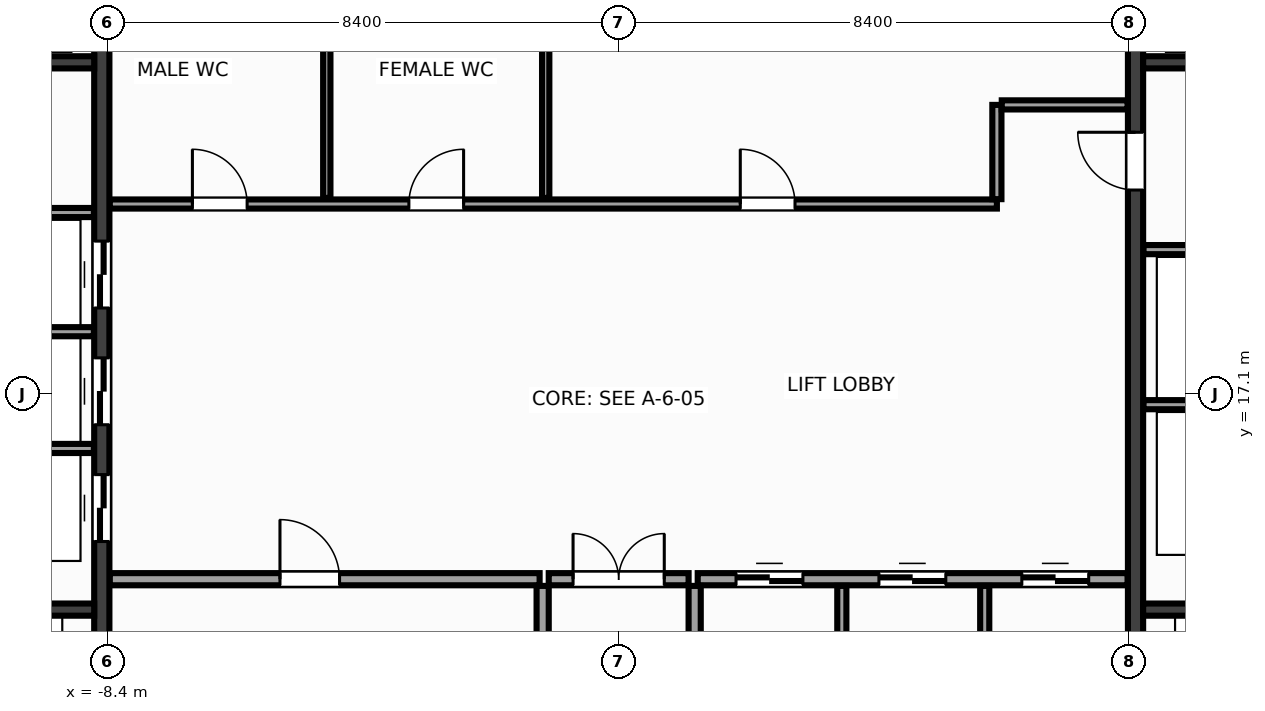
"""IFC4 building model, lengths in metres.
Left out: names, types, materials, properties, quantities, classifications, styles, units other than length and angle.
Written with IfcOpenShell. Run it as: python <this file> out.ifc"""

import sys

from ifc_helpers import new_model, si_unit, direction, frame, frame_2d, origin, place, context, subcontext, project, spatial, rectangle, extrude, source, transform, mapped, element, fill, save


model = new_model("IFC4")
c1 = context("Model", 3, precision=1e-05, world=origin(), true_north=direction((0.0, 1.0)))
c2 = subcontext(c1, "Body", "Model", "MODEL_VIEW")
j1 = project(units=[si_unit("LENGTHUNIT", "METRE"), si_unit("PLANEANGLEUNIT", "RADIAN")], contexts=[c1])
p1 = place(None, origin())
s1 = spatial("IfcSite", under=j1, at=p1, CompositionType="ELEMENT")
p2 = place(p1, origin())
s2 = spatial("IfcBuilding", under=s1, at=p2, CompositionType="ELEMENT")
p3 = place(p2, frame((0.0, 0.0, 146.0)))
s3 = spatial("IfcBuildingStorey", under=s2, at=p3, CompositionType="ELEMENT", Elevation=146.0)
m1 = source(origin(), c2, "Body", "SweptSolid", [
    extrude(rectangle(XDim=12.95, YDim=0.25, at=frame_2d((6.475, 0.0))), origin(), (0.0, 0.0, 1.0), 3.6),
])
p4 = place(p3, frame((-8.5, 10.525, 0.0), z_axis=(0.0, 0.0, 1.0), x_axis=(0.0, 1.0, 0.0)))
e1 = element("IfcWall", 1, at=p4, inside=s3, PredefinedType="SHEAR", context=c2, shape_type="MappedRepresentation", body=[
    mapped(m1, transform((0.0, 0.0, 0.0), x_axis=(1.0, 0.0, 0.0), y_axis=(0.0, 1.0, 0.0), z_axis=(0.0, 0.0, 1.0), scale=1.0)),
])
p5 = place(p4, frame((4.145, 0.0, 0.0)))
e2 = element("IfcOpeningElement", 2, at=p5, cuts=e1, PredefinedType="OPENING", context=c2, shape_type="SweptSolid", body=[
    extrude(rectangle(XDim=1.1, YDim=2.15, at=frame_2d((0.55, 1.075))), frame((0.0, 0.137, 0.0), z_axis=(0.0, -1.0, 0.0), x_axis=(1.0, 0.0, 0.0)), (0.0, 0.0, 1.0), 0.274),
])
p6 = place(p4, frame((6.065, 0.0, 0.0)))
e3 = element("IfcOpeningElement", 3, at=p6, cuts=e1, PredefinedType="OPENING", context=c2, shape_type="SweptSolid", body=[
    extrude(rectangle(XDim=1.1, YDim=2.15, at=frame_2d((0.55, 1.075))), frame((0.0, 0.137, 0.0), z_axis=(0.0, -1.0, 0.0), x_axis=(1.0, 0.0, 0.0)), (0.0, 0.0, 1.0), 0.274),
])
p7 = place(p4, frame((7.985, 0.0, 0.0)))
e4 = element("IfcOpeningElement", 4, at=p7, cuts=e1, PredefinedType="OPENING", context=c2, shape_type="SweptSolid", body=[
    extrude(rectangle(XDim=1.1, YDim=2.15, at=frame_2d((0.55, 1.075))), frame((0.0, 0.137, 0.0), z_axis=(0.0, -1.0, 0.0), x_axis=(1.0, 0.0, 0.0)), (0.0, 0.0, 1.0), 0.274),
])
p8 = place(p3, frame((8.5, 10.525, 0.0), z_axis=(0.0, 0.0, 1.0), x_axis=(0.0, 1.0, 0.0)))
e5 = element("IfcWall", 5, at=p8, inside=s3, PredefinedType="SHEAR", context=c2, shape_type="MappedRepresentation", body=[
    mapped(m1, transform((0.0, 0.0, 0.0), x_axis=(1.0, 0.0, 0.0), y_axis=(0.0, 1.0, 0.0), z_axis=(0.0, 0.0, 1.0), scale=1.0)),
])
p9 = place(p8, frame((9.925, 0.0, 0.0)))
e6 = element("IfcOpeningElement", 6, at=p9, cuts=e5, PredefinedType="OPENING", context=c2, shape_type="SweptSolid", body=[
    extrude(rectangle(XDim=0.95, YDim=2.15, at=frame_2d((0.475, 1.075))), frame((0.0, 0.137, 0.0), z_axis=(0.0, -1.0, 0.0), x_axis=(1.0, 0.0, 0.0)), (0.0, 0.0, 1.0), 0.274),
])
m2 = source(origin(), c2, "Body", "SweptSolid", [
    extrude(rectangle(XDim=2.825, YDim=0.2, at=frame_2d((1.413, 0.0))), origin(), (0.0, 0.0, 1.0), 3.6),
])
for number, where, z_axis, x_axis in (
    (7, (-11.45, 13.55, 0.0), (0.0, 0.0, 1.0), (1.0, 0.0, 0.0)),
    (8, (8.625, 13.55, 0.0), (0.0, 0.0, 1.0), (1.0, 0.0, 0.0)),
):
    element("IfcWall", number, at=place(p3, frame(where, z_axis=z_axis, x_axis=x_axis)), inside=s3, PredefinedType="SHEAR", context=c2, shape_type="MappedRepresentation", body=[
        mapped(m2, transform((0.0, 0.0, 0.0), x_axis=(1.0, 0.0, 0.0), y_axis=(0.0, 1.0, 0.0), z_axis=(0.0, 0.0, 1.0), scale=1.0)),
    ])
m3 = source(origin(), c2, "Body", "SweptSolid", [
    extrude(rectangle(XDim=3.02, YDim=0.2, at=frame_2d((1.51, 0.0))), origin(), (0.0, 0.0, 1.0), 3.6),
])
for number, where, z_axis, x_axis in (
    (9, (-11.645, 22.55, 0.0), (0.0, 0.0, 1.0), (1.0, 0.0, 0.0)),
    (10, (8.625, 22.55, 0.0), (0.0, 0.0, 1.0), (1.0, 0.0, 0.0)),
):
    element("IfcWall", number, at=place(p3, frame(where, z_axis=z_axis, x_axis=x_axis)), inside=s3, PredefinedType="SHEAR", context=c2, shape_type="MappedRepresentation", body=[
        mapped(m3, transform((0.0, 0.0, 0.0), x_axis=(1.0, 0.0, 0.0), y_axis=(0.0, 1.0, 0.0), z_axis=(0.0, 0.0, 1.0), scale=1.0)),
    ])
m4 = source(origin(), c2, "Body", "SweptSolid", [
    extrude(rectangle(XDim=3.01, YDim=0.15, at=frame_2d((1.505, 0.0))), origin(), (0.0, 0.0, 1.0), 3.38),
])
for number, where, z_axis, x_axis in (
    (11, (-11.64, 16.2, 0.0), (0.0, 0.0, 1.0), (1.0, 0.0, 0.0)),
    (12, (-11.64, 18.12, 0.0), (0.0, 0.0, 1.0), (1.0, 0.0, 0.0)),
    (13, (-11.64, 20.08, 0.0), (0.0, 0.0, 1.0), (1.0, 0.0, 0.0)),
    (14, (8.63, 16.92, 0.0), (0.0, 0.0, 1.0), (1.0, 0.0, 0.0)),
    (15, (8.63, 19.47, 0.0), (0.0, 0.0, 1.0), (1.0, 0.0, 0.0)),
):
    element("IfcWall", number, at=place(p3, frame(where, z_axis=z_axis, x_axis=x_axis)), inside=s3, PredefinedType="PARTITIONING", context=c2, shape_type="MappedRepresentation", body=[
        mapped(m4, transform((0.0, 0.0, 0.0), x_axis=(1.0, 0.0, 0.0), y_axis=(0.0, 1.0, 0.0), z_axis=(0.0, 0.0, 1.0), scale=1.0)),
    ])
m5 = source(origin(), c2, "Body", "SweptSolid", [
    extrude(rectangle(XDim=7.07, YDim=0.2, at=frame_2d((3.535, 0.0))), origin(), (0.0, 0.0, 1.0), 3.38),
])
p10 = place(p3, frame((-8.37, 14.05, 0.0), z_axis=(0.0, 0.0, 1.0), x_axis=(1.0, 0.0, 0.0)))
e16 = element("IfcWall", 16, at=p10, inside=s3, PredefinedType="PARTITIONING", context=c2, shape_type="MappedRepresentation", body=[
    mapped(m5, transform((0.0, 0.0, 0.0), x_axis=(1.0, 0.0, 0.0), y_axis=(0.0, 1.0, 0.0), z_axis=(0.0, 0.0, 1.0), scale=1.0)),
])
p11 = place(p10, frame((2.8, 0.0, 0.0)))
e17 = element("IfcOpeningElement", 17, at=p11, cuts=e16, PredefinedType="OPENING", context=c2, shape_type="SweptSolid", body=[
    extrude(rectangle(XDim=0.98, YDim=2.15, at=frame_2d((0.49, 1.075))), frame((0.0, 0.112, 0.0), z_axis=(0.0, -1.0, 0.0), x_axis=(1.0, 0.0, 0.0)), (0.0, 0.0, 1.0), 0.224),
])
p12 = place(p3, frame((1.3, 14.05, 0.0), z_axis=(0.0, 0.0, 1.0), x_axis=(1.0, 0.0, 0.0)))
e18 = element("IfcWall", 18, at=p12, inside=s3, PredefinedType="PARTITIONING", context=c2, shape_type="MappedRepresentation", body=[
    mapped(m5, transform((0.0, 0.0, 0.0), x_axis=(1.0, 0.0, 0.0), y_axis=(0.0, 1.0, 0.0), z_axis=(0.0, 0.0, 1.0), scale=1.0)),
])
p13 = place(p12, frame((0.63, 0.0, 0.0)))
e19 = element("IfcOpeningElement", 19, at=p13, cuts=e18, PredefinedType="OPENING", context=c2, shape_type="SweptSolid", body=[
    extrude(rectangle(XDim=1.1, YDim=2.15, at=frame_2d((0.55, 1.075))), frame((0.0, 0.112, 0.0), z_axis=(0.0, -1.0, 0.0), x_axis=(1.0, 0.0, 0.0)), (0.0, 0.0, 1.0), 0.224),
])
p14 = place(p12, frame((2.98, 0.0, 0.0)))
e20 = element("IfcOpeningElement", 20, at=p14, cuts=e18, PredefinedType="OPENING", context=c2, shape_type="SweptSolid", body=[
    extrude(rectangle(XDim=1.1, YDim=2.15, at=frame_2d((0.55, 1.075))), frame((0.0, 0.112, 0.0), z_axis=(0.0, -1.0, 0.0), x_axis=(1.0, 0.0, 0.0)), (0.0, 0.0, 1.0), 0.224),
])
p15 = place(p12, frame((5.33, 0.0, 0.0)))
e21 = element("IfcOpeningElement", 21, at=p15, cuts=e18, PredefinedType="OPENING", context=c2, shape_type="SweptSolid", body=[
    extrude(rectangle(XDim=1.1, YDim=2.15, at=frame_2d((0.55, 1.075))), frame((0.0, 0.112, 0.0), z_axis=(0.0, -1.0, 0.0), x_axis=(1.0, 0.0, 0.0)), (0.0, 0.0, 1.0), 0.224),
])
m6 = source(origin(), c2, "Body", "SweptSolid", [
    extrude(rectangle(XDim=3.415, YDim=0.2, at=frame_2d((1.708, 0.0))), origin(), (0.0, 0.0, 1.0), 3.38),
])
for number, where, z_axis, x_axis in (
    (22, (-1.25, 10.525, 0.0), (0.0, 0.0, 1.0), (0.0, 1.0, 0.0)),
    (23, (1.25, 10.525, 0.0), (0.0, 0.0, 1.0), (0.0, 1.0, 0.0)),
):
    element("IfcWall", number, at=place(p3, frame(where, z_axis=z_axis, x_axis=x_axis)), inside=s3, PredefinedType="PARTITIONING", context=c2, shape_type="MappedRepresentation", body=[
        mapped(m6, transform((0.0, 0.0, 0.0), x_axis=(1.0, 0.0, 0.0), y_axis=(0.0, 1.0, 0.0), z_axis=(0.0, 0.0, 1.0), scale=1.0)),
    ])
m7 = source(origin(), c2, "Body", "SweptSolid", [
    extrude(rectangle(XDim=2.3, YDim=0.2, at=frame_2d((1.15, 0.0))), origin(), (0.0, 0.0, 1.0), 3.38),
])
p16 = place(p3, frame((-1.15, 14.05, 0.0), z_axis=(0.0, 0.0, 1.0), x_axis=(1.0, 0.0, 0.0)))
e24 = element("IfcWall", 24, at=p16, inside=s3, PredefinedType="PARTITIONING", context=c2, shape_type="MappedRepresentation", body=[
    mapped(m7, transform((0.0, 0.0, 0.0), x_axis=(1.0, 0.0, 0.0), y_axis=(0.0, 1.0, 0.0), z_axis=(0.0, 0.0, 1.0), scale=1.0)),
])
p17 = place(p16, frame((0.4, 0.0, 0.0)))
e25 = element("IfcOpeningElement", 25, at=p17, cuts=e24, PredefinedType="OPENING", context=c2, shape_type="SweptSolid", body=[
    extrude(rectangle(XDim=1.5, YDim=2.2, at=frame_2d((0.75, 1.1))), frame((0.0, 0.112, 0.0), z_axis=(0.0, -1.0, 0.0), x_axis=(1.0, 0.0, 0.0)), (0.0, 0.0, 1.0), 0.224),
])
m8 = source(origin(), c2, "Body", "SweptSolid", [
    extrude(rectangle(XDim=14.59, YDim=0.15, at=frame_2d((7.295, 0.0))), origin(), (0.0, 0.0, 1.0), 3.38),
])
p18 = place(p3, frame((-8.37, 20.22, 0.0), z_axis=(0.0, 0.0, 1.0), x_axis=(1.0, 0.0, 0.0)))
e26 = element("IfcWall", 26, at=p18, inside=s3, PredefinedType="PARTITIONING", context=c2, shape_type="MappedRepresentation", body=[
    mapped(m8, transform((0.0, 0.0, 0.0), x_axis=(1.0, 0.0, 0.0), y_axis=(0.0, 1.0, 0.0), z_axis=(0.0, 0.0, 1.0), scale=1.0)),
])
p19 = place(p18, frame((1.36, 0.0, 0.0)))
e27 = element("IfcOpeningElement", 27, at=p19, cuts=e26, PredefinedType="OPENING", context=c2, shape_type="SweptSolid", body=[
    extrude(rectangle(XDim=0.9, YDim=2.15, at=frame_2d((0.45, 1.075))), frame((0.0, 0.087, 0.0), z_axis=(0.0, -1.0, 0.0), x_axis=(1.0, 0.0, 0.0)), (0.0, 0.0, 1.0), 0.174),
])
p20 = place(p18, frame((4.92, 0.0, 0.0)))
e28 = element("IfcOpeningElement", 28, at=p20, cuts=e26, PredefinedType="OPENING", context=c2, shape_type="SweptSolid", body=[
    extrude(rectangle(XDim=0.9, YDim=2.15, at=frame_2d((0.45, 1.075))), frame((0.0, 0.087, 0.0), z_axis=(0.0, -1.0, 0.0), x_axis=(1.0, 0.0, 0.0)), (0.0, 0.0, 1.0), 0.174),
])
p21 = place(p18, frame((10.37, 0.0, 0.0)))
e29 = element("IfcOpeningElement", 29, at=p21, cuts=e26, PredefinedType="OPENING", context=c2, shape_type="SweptSolid", body=[
    extrude(rectangle(XDim=0.9, YDim=2.15, at=frame_2d((0.45, 1.075))), frame((0.0, 0.087, 0.0), z_axis=(0.0, -1.0, 0.0), x_axis=(1.0, 0.0, 0.0)), (0.0, 0.0, 1.0), 0.174),
])
m9 = source(origin(), c2, "Body", "SweptSolid", [
    extrude(rectangle(XDim=1.55, YDim=0.15, at=frame_2d((0.775, 0.0))), origin(), (0.0, 0.0, 1.0), 3.38),
])
p22 = place(p3, frame((6.22, 20.3, 0.0), z_axis=(0.0, 0.0, 1.0), x_axis=(0.0, 1.0, 0.0)))
e30 = element("IfcWall", 30, at=p22, inside=s3, PredefinedType="PARTITIONING", context=c2, shape_type="MappedRepresentation", body=[
    mapped(m9, transform((0.0, 0.0, 0.0), x_axis=(1.0, 0.0, 0.0), y_axis=(0.0, 1.0, 0.0), z_axis=(0.0, 0.0, 1.0), scale=1.0)),
])
m10 = source(origin(), c2, "Body", "SweptSolid", [
    extrude(rectangle(XDim=2.07, YDim=0.15, at=frame_2d((1.035, 0.0))), origin(), (0.0, 0.0, 1.0), 3.38),
])
p23 = place(p3, frame((6.3, 21.85, 0.0), z_axis=(0.0, 0.0, 1.0), x_axis=(1.0, 0.0, 0.0)))
e31 = element("IfcWall", 31, at=p23, inside=s3, PredefinedType="PARTITIONING", context=c2, shape_type="MappedRepresentation", body=[
    mapped(m10, transform((0.0, 0.0, 0.0), x_axis=(1.0, 0.0, 0.0), y_axis=(0.0, 1.0, 0.0), z_axis=(0.0, 0.0, 1.0), scale=1.0)),
])
m11 = source(origin(), c2, "Body", "SweptSolid", [
    extrude(rectangle(XDim=3.415, YDim=0.15, at=frame_2d((1.708, 0.0))), origin(), (0.0, 0.0, 1.0), 3.38),
])
for number, where, z_axis, x_axis in (
    (32, (3.67, 10.525, 0.0), (0.0, 0.0, 1.0), (0.0, 1.0, 0.0)),
    (33, (6.02, 10.525, 0.0), (0.0, 0.0, 1.0), (0.0, 1.0, 0.0)),
):
    element("IfcWall", number, at=place(p3, frame(where, z_axis=z_axis, x_axis=x_axis)), inside=s3, PredefinedType="PARTITIONING", context=c2, shape_type="MappedRepresentation", body=[
        mapped(m11, transform((0.0, 0.0, 0.0), x_axis=(1.0, 0.0, 0.0), y_axis=(0.0, 1.0, 0.0), z_axis=(0.0, 0.0, 1.0), scale=1.0)),
    ])
m12 = source(origin(), c2, "Body", "SweptSolid", [
    extrude(rectangle(XDim=3.115, YDim=0.12, at=frame_2d((1.558, 0.0))), origin(), (0.0, 0.0, 1.0), 3.38),
])
for number, where, z_axis, x_axis in (
    (34, (-4.8, 20.32, 0.0), (0.0, 0.0, 1.0), (0.0, 1.0, 0.0)),
    (35, (-1.2, 20.32, 0.0), (0.0, 0.0, 1.0), (0.0, 1.0, 0.0)),
):
    element("IfcWall", number, at=place(p3, frame(where, z_axis=z_axis, x_axis=x_axis)), inside=s3, PredefinedType="PARTITIONING", context=c2, shape_type="MappedRepresentation", body=[
        mapped(m12, transform((0.0, 0.0, 0.0), x_axis=(1.0, 0.0, 0.0), y_axis=(0.0, 1.0, 0.0), z_axis=(0.0, 0.0, 1.0), scale=1.0)),
    ])
m13 = source(origin(), c2, "Body", "SweptSolid", [
    extrude(rectangle(XDim=1.1, YDim=2.15, at=frame_2d((0.55, 1.075))), frame((0.0, 0.025, 0.0), z_axis=(0.0, -1.0, 0.0), x_axis=(1.0, 0.0, 0.0)), (0.0, 0.0, 1.0), 0.05),
])
p24 = place(p5, origin())
e36 = element("IfcDoor", 36, at=p24, inside=s3, OperationType="DOUBLE_DOOR_SLIDING", PredefinedType="DOOR", context=c2, shape_type="MappedRepresentation", body=[
    mapped(m13, transform((0.0, 0.0, 0.0), x_axis=(1.0, 0.0, 0.0), y_axis=(0.0, 1.0, 0.0), z_axis=(0.0, 0.0, 1.0), scale=1.0)),
])
fill(e2, e36)
p25 = place(p6, origin())
e37 = element("IfcDoor", 37, at=p25, inside=s3, OperationType="DOUBLE_DOOR_SLIDING", PredefinedType="DOOR", context=c2, shape_type="MappedRepresentation", body=[
    mapped(m13, transform((0.0, 0.0, 0.0), x_axis=(1.0, 0.0, 0.0), y_axis=(0.0, 1.0, 0.0), z_axis=(0.0, 0.0, 1.0), scale=1.0)),
])
fill(e3, e37)
p26 = place(p7, origin())
e38 = element("IfcDoor", 38, at=p26, inside=s3, OperationType="DOUBLE_DOOR_SLIDING", PredefinedType="DOOR", context=c2, shape_type="MappedRepresentation", body=[
    mapped(m13, transform((0.0, 0.0, 0.0), x_axis=(1.0, 0.0, 0.0), y_axis=(0.0, 1.0, 0.0), z_axis=(0.0, 0.0, 1.0), scale=1.0)),
])
fill(e4, e38)
m14 = source(origin(), c2, "Body", "SweptSolid", [
    extrude(rectangle(XDim=0.95, YDim=2.15, at=frame_2d((0.475, 1.075))), frame((0.0, 0.025, 0.0), z_axis=(0.0, -1.0, 0.0), x_axis=(1.0, 0.0, 0.0)), (0.0, 0.0, 1.0), 0.05),
])
p27 = place(p9, origin())
e39 = element("IfcDoor", 39, at=p27, inside=s3, OperationType="SINGLE_SWING_RIGHT", PredefinedType="DOOR", context=c2, shape_type="MappedRepresentation", body=[
    mapped(m14, transform((0.0, 0.0, 0.0), x_axis=(1.0, 0.0, 0.0), y_axis=(0.0, 1.0, 0.0), z_axis=(0.0, 0.0, 1.0), scale=1.0)),
])
fill(e6, e39)
m15 = source(origin(), c2, "Body", "SweptSolid", [
    extrude(rectangle(XDim=0.98, YDim=2.15, at=frame_2d((0.49, 1.075))), frame((0.0, 0.025, 0.0), z_axis=(0.0, -1.0, 0.0), x_axis=(1.0, 0.0, 0.0)), (0.0, 0.0, 1.0), 0.05),
])
p28 = place(p11, origin())
e40 = element("IfcDoor", 40, at=p28, inside=s3, OperationType="SINGLE_SWING_LEFT", PredefinedType="DOOR", context=c2, shape_type="MappedRepresentation", body=[
    mapped(m15, transform((0.0, 0.0, 0.0), x_axis=(1.0, 0.0, 0.0), y_axis=(0.0, 1.0, 0.0), z_axis=(0.0, 0.0, 1.0), scale=1.0)),
])
fill(e17, e40)
p29 = place(p13, origin())
e41 = element("IfcDoor", 41, at=p29, inside=s3, OperationType="DOUBLE_DOOR_SLIDING", PredefinedType="DOOR", context=c2, shape_type="MappedRepresentation", body=[
    mapped(m13, transform((0.0, 0.0, 0.0), x_axis=(1.0, 0.0, 0.0), y_axis=(0.0, 1.0, 0.0), z_axis=(0.0, 0.0, 1.0), scale=1.0)),
])
fill(e19, e41)
p30 = place(p14, origin())
e42 = element("IfcDoor", 42, at=p30, inside=s3, OperationType="DOUBLE_DOOR_SLIDING", PredefinedType="DOOR", context=c2, shape_type="MappedRepresentation", body=[
    mapped(m13, transform((0.0, 0.0, 0.0), x_axis=(1.0, 0.0, 0.0), y_axis=(0.0, 1.0, 0.0), z_axis=(0.0, 0.0, 1.0), scale=1.0)),
])
fill(e20, e42)
p31 = place(p15, origin())
e43 = element("IfcDoor", 43, at=p31, inside=s3, OperationType="DOUBLE_DOOR_SLIDING", PredefinedType="DOOR", context=c2, shape_type="MappedRepresentation", body=[
    mapped(m13, transform((0.0, 0.0, 0.0), x_axis=(1.0, 0.0, 0.0), y_axis=(0.0, 1.0, 0.0), z_axis=(0.0, 0.0, 1.0), scale=1.0)),
])
fill(e21, e43)
m16 = source(origin(), c2, "Body", "SweptSolid", [
    extrude(rectangle(XDim=1.5, YDim=2.2, at=frame_2d((0.75, 1.1))), frame((0.0, 0.025, 0.0), z_axis=(0.0, -1.0, 0.0), x_axis=(1.0, 0.0, 0.0)), (0.0, 0.0, 1.0), 0.05),
])
p32 = place(p17, origin())
e44 = element("IfcDoor", 44, at=p32, inside=s3, OperationType="DOUBLE_DOOR_SINGLE_SWING", PredefinedType="DOOR", context=c2, shape_type="MappedRepresentation", body=[
    mapped(m16, transform((0.0, 0.0, 0.0), x_axis=(1.0, 0.0, 0.0), y_axis=(0.0, 1.0, 0.0), z_axis=(0.0, 0.0, 1.0), scale=1.0)),
])
fill(e25, e44)
m17 = source(origin(), c2, "Body", "SweptSolid", [
    extrude(rectangle(XDim=0.9, YDim=2.15, at=frame_2d((0.45, 1.075))), frame((0.0, 0.025, 0.0), z_axis=(0.0, -1.0, 0.0), x_axis=(1.0, 0.0, 0.0)), (0.0, 0.0, 1.0), 0.05),
])
p33 = place(p19, origin())
e45 = element("IfcDoor", 45, at=p33, inside=s3, OperationType="SINGLE_SWING_LEFT", PredefinedType="DOOR", context=c2, shape_type="MappedRepresentation", body=[
    mapped(m17, transform((0.0, 0.0, 0.0), x_axis=(1.0, 0.0, 0.0), y_axis=(0.0, 1.0, 0.0), z_axis=(0.0, 0.0, 1.0), scale=1.0)),
])
fill(e27, e45)
p34 = place(p20, origin())
e46 = element("IfcDoor", 46, at=p34, inside=s3, OperationType="SINGLE_SWING_RIGHT", PredefinedType="DOOR", context=c2, shape_type="MappedRepresentation", body=[
    mapped(m17, transform((0.0, 0.0, 0.0), x_axis=(1.0, 0.0, 0.0), y_axis=(0.0, 1.0, 0.0), z_axis=(0.0, 0.0, 1.0), scale=1.0)),
])
fill(e28, e46)
p35 = place(p21, origin())
e47 = element("IfcDoor", 47, at=p35, inside=s3, OperationType="SINGLE_SWING_LEFT", PredefinedType="DOOR", context=c2, shape_type="MappedRepresentation", body=[
    mapped(m17, transform((0.0, 0.0, 0.0), x_axis=(1.0, 0.0, 0.0), y_axis=(0.0, 1.0, 0.0), z_axis=(0.0, 0.0, 1.0), scale=1.0)),
])
fill(e29, e47)
save(model, sys.argv[1])
